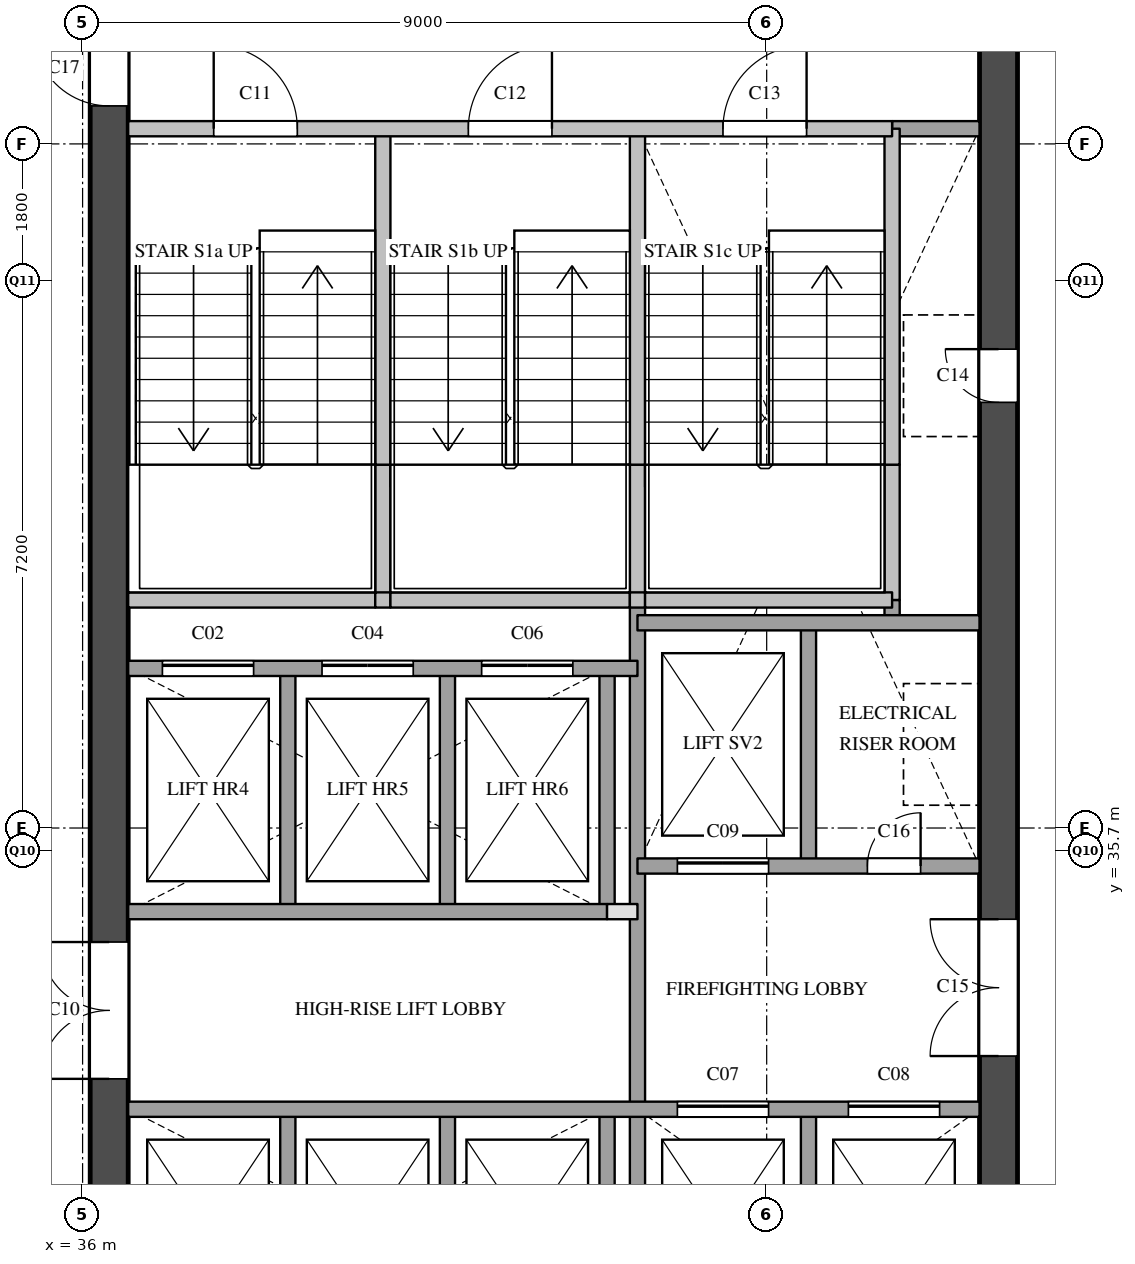
"""IFC4 building model, lengths in metres.
Left out: names, types, materials, properties, quantities, classifications, styles, units other than length and angle.
Written with IfcOpenShell. Run it as: python <this file> out.ifc"""

import sys

from ifc_helpers import new_model, si_unit, direction, frame, frame_2d, origin, place, context, subcontext, project, spatial, rectangle, extrude, element, fill, save


model = new_model("IFC4")
c1 = context("Model", 3, precision=1e-05, world=origin(), true_north=direction((0.0, 1.0)))
c2 = subcontext(c1, "Body", "Model", "MODEL_VIEW")
j1 = project(units=[si_unit("LENGTHUNIT", "METRE"), si_unit("PLANEANGLEUNIT", "RADIAN")], contexts=[c1])
p1 = place(None, origin())
s1 = spatial("IfcSite", under=j1, at=p1, CompositionType="ELEMENT")
p2 = place(p1, origin())
s2 = spatial("IfcBuilding", under=s1, at=p2, CompositionType="ELEMENT")
p3 = place(p2, frame((0.0, 0.0, 177.8)))
s3 = spatial("IfcBuildingStorey", under=s2, at=p3, CompositionType="ELEMENT", Elevation=177.8)
p4 = place(p3, frame((36.35, 29.1, 0.0), z_axis=(0.0, 0.0, 1.0), x_axis=(0.0, 1.0, 0.0)))
e1 = element("IfcWall", 1, at=p4, inside=s3, PredefinedType="SHEAR", context=c2, shape_type="SweptSolid", body=[
    extrude(rectangle(XDim=20.3, YDim=0.5, at=frame_2d((10.15, 0.0))), origin(), (0.0, 0.0, 1.0), 3.6),
])
p5 = place(p4, frame((3.6, 0.0, 0.0)))
e2 = element("IfcOpeningElement", 2, at=p5, cuts=e1, PredefinedType="OPENING", context=c2, shape_type="SweptSolid", body=[
    extrude(rectangle(XDim=1.8, YDim=2.1, at=frame_2d((0.9, 1.05))), frame((0.0, 0.26, 0.0), z_axis=(0.0, -1.0, 0.0), x_axis=(1.0, 0.0, 0.0)), (0.0, 0.0, 1.0), 0.52),
])
p6 = place(p4, frame((16.4, 0.0, 0.0)))
e3 = element("IfcOpeningElement", 3, at=p6, cuts=e1, PredefinedType="OPENING", context=c2, shape_type="SweptSolid", body=[
    extrude(rectangle(XDim=1.0, YDim=2.1, at=frame_2d((0.5, 1.05))), frame((0.0, 0.26, 0.0), z_axis=(0.0, -1.0, 0.0), x_axis=(1.0, 0.0, 0.0)), (0.0, 0.0, 1.0), 0.52),
])
p7 = place(p3, frame((48.05, 29.1, 0.0), z_axis=(0.0, 0.0, 1.0), x_axis=(0.0, 1.0, 0.0)))
e4 = element("IfcWall", 4, at=p7, inside=s3, PredefinedType="SHEAR", context=c2, shape_type="SweptSolid", body=[
    extrude(rectangle(XDim=20.3, YDim=0.5, at=frame_2d((10.15, 0.0))), origin(), (0.0, 0.0, 1.0), 3.6),
])
p8 = place(p7, frame((12.5, 0.0, 0.0)))
e5 = element("IfcOpeningElement", 5, at=p8, cuts=e4, PredefinedType="OPENING", context=c2, shape_type="SweptSolid", body=[
    extrude(rectangle(XDim=0.7, YDim=2.1, at=frame_2d((0.35, 1.05))), frame((0.0, 0.26, 0.0), z_axis=(0.0, -1.0, 0.0), x_axis=(1.0, 0.0, 0.0)), (0.0, 0.0, 1.0), 0.52),
])
p9 = place(p7, frame((3.9, 0.0, 0.0)))
e6 = element("IfcOpeningElement", 6, at=p9, cuts=e4, PredefinedType="OPENING", context=c2, shape_type="SweptSolid", body=[
    extrude(rectangle(XDim=1.8, YDim=2.1, at=frame_2d((0.9, 1.05))), frame((0.0, 0.26, 0.0), z_axis=(0.0, -1.0, 0.0), x_axis=(1.0, 0.0, 0.0)), (0.0, 0.0, 1.0), 0.52),
])
p10 = place(p3, frame((38.7, 29.1, 0.0), z_axis=(0.0, 0.0, 1.0), x_axis=(0.0, 1.0, 0.0)))
e7 = element("IfcWall", 7, at=p10, inside=s3, PredefinedType="SOLIDWALL", context=c2, shape_type="SweptSolid", body=[
    extrude(rectangle(XDim=3.2, YDim=0.2, at=frame_2d((1.6, 0.0))), origin(), (0.0, 0.0, 1.0), 3.6),
])
p11 = place(p3, frame((38.7, 34.9, 0.0), z_axis=(0.0, 0.0, 1.0), x_axis=(0.0, 1.0, 0.0)))
e8 = element("IfcWall", 8, at=p11, inside=s3, PredefinedType="SOLIDWALL", context=c2, shape_type="SweptSolid", body=[
    extrude(rectangle(XDim=3.2, YDim=0.2, at=frame_2d((1.6, 0.0))), origin(), (0.0, 0.0, 1.0), 3.6),
])
p12 = place(p3, frame((39.95, 39.0, 0.0), z_axis=(0.0, 0.0, 1.0), x_axis=(0.0, 1.0, 0.0)))
e9 = element("IfcWall", 9, at=p12, inside=s3, PredefinedType="SOLIDWALL", context=c2, shape_type="SweptSolid", body=[
    extrude(rectangle(XDim=1.78, YDim=0.2, at=frame_2d((0.89, 0.0))), origin(), (0.0, 0.0, 1.0), 3.6),
])
p13 = place(p3, frame((39.95, 40.78, 0.0), z_axis=(0.0, 0.0, 1.0), x_axis=(0.0, 1.0, 0.0)))
e10 = element("IfcWall", 10, at=p13, inside=s3, PredefinedType="SOLIDWALL", context=c2, shape_type="SweptSolid", body=[
    extrude(rectangle(XDim=4.42, YDim=0.2, at=frame_2d((2.21, 0.0))), origin(), (0.0, 0.0, 1.0), 3.6),
])
p14 = place(p3, frame((40.8, 29.1, 0.0), z_axis=(0.0, 0.0, 1.0), x_axis=(0.0, 1.0, 0.0)))
e11 = element("IfcWall", 11, at=p14, inside=s3, PredefinedType="SOLIDWALL", context=c2, shape_type="SweptSolid", body=[
    extrude(rectangle(XDim=3.2, YDim=0.2, at=frame_2d((1.6, 0.0))), origin(), (0.0, 0.0, 1.0), 3.6),
])
p15 = place(p3, frame((40.8, 34.9, 0.0), z_axis=(0.0, 0.0, 1.0), x_axis=(0.0, 1.0, 0.0)))
e12 = element("IfcWall", 12, at=p15, inside=s3, PredefinedType="SOLIDWALL", context=c2, shape_type="SweptSolid", body=[
    extrude(rectangle(XDim=3.2, YDim=0.2, at=frame_2d((1.6, 0.0))), origin(), (0.0, 0.0, 1.0), 3.6),
])
p16 = place(p3, frame((42.9, 29.1, 0.0), z_axis=(0.0, 0.0, 1.0), x_axis=(0.0, 1.0, 0.0)))
e13 = element("IfcWall", 13, at=p16, inside=s3, PredefinedType="SOLIDWALL", context=c2, shape_type="SweptSolid", body=[
    extrude(rectangle(XDim=3.2, YDim=0.2, at=frame_2d((1.6, 0.0))), origin(), (0.0, 0.0, 1.0), 3.6),
])
p17 = place(p3, frame((42.9, 34.9, 0.0), z_axis=(0.0, 0.0, 1.0), x_axis=(0.0, 1.0, 0.0)))
e14 = element("IfcWall", 14, at=p17, inside=s3, PredefinedType="SOLIDWALL", context=c2, shape_type="SweptSolid", body=[
    extrude(rectangle(XDim=3.2, YDim=0.2, at=frame_2d((1.6, 0.0))), origin(), (0.0, 0.0, 1.0), 3.6),
])
p18 = place(p3, frame((43.3, 29.1, 0.0), z_axis=(0.0, 0.0, 1.0), x_axis=(0.0, 1.0, 0.0)))
e15 = element("IfcWall", 15, at=p18, inside=s3, PredefinedType="SOLIDWALL", context=c2, shape_type="SweptSolid", body=[
    extrude(rectangle(XDim=9.9, YDim=0.2, at=frame_2d((4.95, 0.0))), origin(), (0.0, 0.0, 1.0), 3.6),
])
p19 = place(p3, frame((43.3, 39.0, 0.0), z_axis=(0.0, 0.0, 1.0), x_axis=(0.0, 1.0, 0.0)))
e16 = element("IfcWall", 16, at=p19, inside=s3, PredefinedType="SOLIDWALL", context=c2, shape_type="SweptSolid", body=[
    extrude(rectangle(XDim=1.78, YDim=0.2, at=frame_2d((0.89, 0.0))), origin(), (0.0, 0.0, 1.0), 3.6),
])
p20 = place(p3, frame((43.3, 40.78, 0.0), z_axis=(0.0, 0.0, 1.0), x_axis=(0.0, 1.0, 0.0)))
e17 = element("IfcWall", 17, at=p20, inside=s3, PredefinedType="SOLIDWALL", context=c2, shape_type="SweptSolid", body=[
    extrude(rectangle(XDim=4.42, YDim=0.2, at=frame_2d((2.21, 0.0))), origin(), (0.0, 0.0, 1.0), 3.6),
])
for number, where, z_axis, x_axis in (
    (18, (45.55, 29.1, 0.0), (0.0, 0.0, 1.0), (0.0, 1.0, 0.0)),
    (19, (45.55, 35.5, 0.0), (0.0, 0.0, 1.0), (0.0, 1.0, 0.0)),
):
    element("IfcWall", number, at=place(p3, frame(where, z_axis=z_axis, x_axis=x_axis)), inside=s3, PredefinedType="SOLIDWALL", context=c2, shape_type="SweptSolid", body=[
        extrude(rectangle(XDim=3.2, YDim=0.2, at=frame_2d((1.6, 0.0))), origin(), (0.0, 0.0, 1.0), 3.6),
    ])
p21 = place(p3, frame((46.65, 38.7, 0.0), z_axis=(0.0, 0.0, 1.0), x_axis=(0.0, 1.0, 0.0)))
e20 = element("IfcWall", 20, at=p21, inside=s3, PredefinedType="SOLIDWALL", context=c2, shape_type="SweptSolid", body=[
    extrude(rectangle(XDim=0.3, YDim=0.2, at=frame_2d((0.15, 0.0))), origin(), (0.0, 0.0, 1.0), 3.6),
])
p22 = place(p3, frame((46.65, 39.0, 0.0), z_axis=(0.0, 0.0, 1.0), x_axis=(0.0, 1.0, 0.0)))
e21 = element("IfcWall", 21, at=p22, inside=s3, PredefinedType="SOLIDWALL", context=c2, shape_type="SweptSolid", body=[
    extrude(rectangle(XDim=1.78, YDim=0.2, at=frame_2d((0.89, 0.0))), origin(), (0.0, 0.0, 1.0), 3.6),
])
p23 = place(p3, frame((46.65, 40.78, 0.0), z_axis=(0.0, 0.0, 1.0), x_axis=(0.0, 1.0, 0.0)))
e22 = element("IfcWall", 22, at=p23, inside=s3, PredefinedType="SOLIDWALL", context=c2, shape_type="SweptSolid", body=[
    extrude(rectangle(XDim=4.42, YDim=0.2, at=frame_2d((2.21, 0.0))), origin(), (0.0, 0.0, 1.0), 3.6),
])
p24 = place(p3, frame((36.6, 32.3, 0.0), z_axis=(0.0, 0.0, 1.0), x_axis=(1.0, 0.0, 0.0)))
e23 = element("IfcWall", 23, at=p24, inside=s3, PredefinedType="SOLIDWALL", context=c2, shape_type="SweptSolid", body=[
    extrude(rectangle(XDim=11.2, YDim=0.2, at=frame_2d((5.6, 0.0))), origin(), (0.0, 0.0, 1.0), 3.6),
])
p25 = place(p24, frame((7.225, 0.0, 0.0)))
e24 = element("IfcOpeningElement", 24, at=p25, cuts=e23, PredefinedType="OPENING", context=c2, shape_type="SweptSolid", body=[
    extrude(rectangle(XDim=1.2, YDim=2.1, at=frame_2d((0.6, 1.05))), frame((0.0, 0.11, 0.0), z_axis=(0.0, -1.0, 0.0), x_axis=(1.0, 0.0, 0.0)), (0.0, 0.0, 1.0), 0.22),
])
p26 = place(p24, frame((9.475, 0.0, 0.0)))
e25 = element("IfcOpeningElement", 25, at=p26, cuts=e23, PredefinedType="OPENING", context=c2, shape_type="SweptSolid", body=[
    extrude(rectangle(XDim=1.2, YDim=2.1, at=frame_2d((0.6, 1.05))), frame((0.0, 0.11, 0.0), z_axis=(0.0, -1.0, 0.0), x_axis=(1.0, 0.0, 0.0)), (0.0, 0.0, 1.0), 0.22),
])
p27 = place(p3, frame((42.9, 34.9, 0.0), z_axis=(0.0, 0.0, 1.0), x_axis=(1.0, 0.0, 0.0)))
e26 = element("IfcWall", 26, at=p27, inside=s3, PredefinedType="PARTITIONING", context=c2, shape_type="SweptSolid", body=[
    extrude(rectangle(XDim=0.4, YDim=0.2, at=frame_2d((0.2, 0.0))), origin(), (0.0, 0.0, 1.0), 3.6),
])
p28 = place(p3, frame((36.6, 34.9, 0.0), z_axis=(0.0, 0.0, 1.0), x_axis=(1.0, 0.0, 0.0)))
e27 = element("IfcWall", 27, at=p28, inside=s3, PredefinedType="SOLIDWALL", context=c2, shape_type="SweptSolid", body=[
    extrude(rectangle(XDim=6.3, YDim=0.2, at=frame_2d((3.15, 0.0))), origin(), (0.0, 0.0, 1.0), 3.6),
])
p29 = place(p3, frame((43.3, 35.5, 0.0), z_axis=(0.0, 0.0, 1.0), x_axis=(1.0, 0.0, 0.0)))
e28 = element("IfcWall", 28, at=p29, inside=s3, PredefinedType="SOLIDWALL", context=c2, shape_type="SweptSolid", body=[
    extrude(rectangle(XDim=4.5, YDim=0.2, at=frame_2d((2.25, 0.0))), origin(), (0.0, 0.0, 1.0), 3.6),
])
p30 = place(p29, frame((0.525, 0.0, 0.0)))
e29 = element("IfcOpeningElement", 29, at=p30, cuts=e28, PredefinedType="OPENING", context=c2, shape_type="SweptSolid", body=[
    extrude(rectangle(XDim=1.2, YDim=2.1, at=frame_2d((0.6, 1.05))), frame((0.0, 0.11, 0.0), z_axis=(0.0, -1.0, 0.0), x_axis=(1.0, 0.0, 0.0)), (0.0, 0.0, 1.0), 0.22),
])
p31 = place(p29, frame((3.025, 0.0, 0.0)))
e30 = element("IfcOpeningElement", 30, at=p31, cuts=e28, PredefinedType="OPENING", context=c2, shape_type="SweptSolid", body=[
    extrude(rectangle(XDim=0.7, YDim=2.1, at=frame_2d((0.35, 1.05))), frame((0.0, 0.11, 0.0), z_axis=(0.0, -1.0, 0.0), x_axis=(1.0, 0.0, 0.0)), (0.0, 0.0, 1.0), 0.22),
])
p32 = place(p3, frame((36.6, 38.1, 0.0), z_axis=(0.0, 0.0, 1.0), x_axis=(1.0, 0.0, 0.0)))
e31 = element("IfcWall", 31, at=p32, inside=s3, PredefinedType="SOLIDWALL", context=c2, shape_type="SweptSolid", body=[
    extrude(rectangle(XDim=6.7, YDim=0.2, at=frame_2d((3.35, 0.0))), origin(), (0.0, 0.0, 1.0), 3.6),
])
p33 = place(p32, frame((0.45, 0.0, 0.0)))
e32 = element("IfcOpeningElement", 32, at=p33, cuts=e31, PredefinedType="OPENING", context=c2, shape_type="SweptSolid", body=[
    extrude(rectangle(XDim=1.2, YDim=2.1, at=frame_2d((0.6, 1.05))), frame((0.0, 0.11, 0.0), z_axis=(0.0, -1.0, 0.0), x_axis=(1.0, 0.0, 0.0)), (0.0, 0.0, 1.0), 0.22),
])
p34 = place(p32, frame((2.55, 0.0, 0.0)))
e33 = element("IfcOpeningElement", 33, at=p34, cuts=e31, PredefinedType="OPENING", context=c2, shape_type="SweptSolid", body=[
    extrude(rectangle(XDim=1.2, YDim=2.1, at=frame_2d((0.6, 1.05))), frame((0.0, 0.11, 0.0), z_axis=(0.0, -1.0, 0.0), x_axis=(1.0, 0.0, 0.0)), (0.0, 0.0, 1.0), 0.22),
])
p35 = place(p32, frame((4.65, 0.0, 0.0)))
e34 = element("IfcOpeningElement", 34, at=p35, cuts=e31, PredefinedType="OPENING", context=c2, shape_type="SweptSolid", body=[
    extrude(rectangle(XDim=1.2, YDim=2.1, at=frame_2d((0.6, 1.05))), frame((0.0, 0.11, 0.0), z_axis=(0.0, -1.0, 0.0), x_axis=(1.0, 0.0, 0.0)), (0.0, 0.0, 1.0), 0.22),
])
p36 = place(p3, frame((43.3, 38.7, 0.0), z_axis=(0.0, 0.0, 1.0), x_axis=(1.0, 0.0, 0.0)))
e35 = element("IfcWall", 35, at=p36, inside=s3, PredefinedType="SOLIDWALL", context=c2, shape_type="SweptSolid", body=[
    extrude(rectangle(XDim=4.5, YDim=0.2, at=frame_2d((2.25, 0.0))), origin(), (0.0, 0.0, 1.0), 3.6),
])
p37 = place(p3, frame((36.6, 39.0, 0.0), z_axis=(0.0, 0.0, 1.0), x_axis=(1.0, 0.0, 0.0)))
e36 = element("IfcWall", 36, at=p37, inside=s3, PredefinedType="SOLIDWALL", context=c2, shape_type="SweptSolid", body=[
    extrude(rectangle(XDim=3.25, YDim=0.2, at=frame_2d((1.625, 0.0))), origin(), (0.0, 0.0, 1.0), 3.6),
])
p38 = place(p3, frame((39.85, 39.0, 0.0), z_axis=(0.0, 0.0, 1.0), x_axis=(1.0, 0.0, 0.0)))
e37 = element("IfcWall", 37, at=p38, inside=s3, PredefinedType="SOLIDWALL", context=c2, shape_type="SweptSolid", body=[
    extrude(rectangle(XDim=0.2, YDim=0.2, at=frame_2d((0.1, 0.0))), origin(), (0.0, 0.0, 1.0), 3.6),
])
p39 = place(p3, frame((40.05, 39.0, 0.0), z_axis=(0.0, 0.0, 1.0), x_axis=(1.0, 0.0, 0.0)))
e38 = element("IfcWall", 38, at=p39, inside=s3, PredefinedType="SOLIDWALL", context=c2, shape_type="SweptSolid", body=[
    extrude(rectangle(XDim=3.15, YDim=0.2, at=frame_2d((1.575, 0.0))), origin(), (0.0, 0.0, 1.0), 3.6),
])
p40 = place(p3, frame((43.2, 39.0, 0.0), z_axis=(0.0, 0.0, 1.0), x_axis=(1.0, 0.0, 0.0)))
e39 = element("IfcWall", 39, at=p40, inside=s3, PredefinedType="SOLIDWALL", context=c2, shape_type="SweptSolid", body=[
    extrude(rectangle(XDim=0.2, YDim=0.2, at=frame_2d((0.1, 0.0))), origin(), (0.0, 0.0, 1.0), 3.6),
])
p41 = place(p3, frame((43.4, 39.0, 0.0), z_axis=(0.0, 0.0, 1.0), x_axis=(1.0, 0.0, 0.0)))
e40 = element("IfcWall", 40, at=p41, inside=s3, PredefinedType="SOLIDWALL", context=c2, shape_type="SweptSolid", body=[
    extrude(rectangle(XDim=3.25, YDim=0.2, at=frame_2d((1.625, 0.0))), origin(), (0.0, 0.0, 1.0), 3.6),
])
p42 = place(p3, frame((46.65, 45.2, 0.0), z_axis=(0.0, 0.0, 1.0), x_axis=(1.0, 0.0, 0.0)))
e41 = element("IfcWall", 41, at=p42, inside=s3, PredefinedType="SOLIDWALL", context=c2, shape_type="SweptSolid", body=[
    extrude(rectangle(XDim=1.15, YDim=0.2, at=frame_2d((0.575, 0.0))), origin(), (0.0, 0.0, 1.0), 3.6),
])
p43 = place(p3, frame((36.6, 45.2, 0.0), z_axis=(0.0, 0.0, 1.0), x_axis=(1.0, 0.0, 0.0)))
e42 = element("IfcWall", 42, at=p43, inside=s3, PredefinedType="SOLIDWALL", context=c2, shape_type="SweptSolid", body=[
    extrude(rectangle(XDim=10.05, YDim=0.2, at=frame_2d((5.025, 0.0))), origin(), (0.0, 0.0, 1.0), 3.6),
])
p44 = place(p43, frame((1.125, 0.0, 0.0)))
e43 = element("IfcOpeningElement", 43, at=p44, cuts=e42, PredefinedType="OPENING", context=c2, shape_type="SweptSolid", body=[
    extrude(rectangle(XDim=1.1, YDim=2.1, at=frame_2d((0.55, 1.05))), frame((0.0, 0.11, 0.0), z_axis=(0.0, -1.0, 0.0), x_axis=(1.0, 0.0, 0.0)), (0.0, 0.0, 1.0), 0.22),
])
p45 = place(p43, frame((4.475, 0.0, 0.0)))
e44 = element("IfcOpeningElement", 44, at=p45, cuts=e42, PredefinedType="OPENING", context=c2, shape_type="SweptSolid", body=[
    extrude(rectangle(XDim=1.1, YDim=2.1, at=frame_2d((0.55, 1.05))), frame((0.0, 0.11, 0.0), z_axis=(0.0, -1.0, 0.0), x_axis=(1.0, 0.0, 0.0)), (0.0, 0.0, 1.0), 0.22),
])
p46 = place(p43, frame((7.825, 0.0, 0.0)))
e45 = element("IfcOpeningElement", 45, at=p46, cuts=e42, PredefinedType="OPENING", context=c2, shape_type="SweptSolid", body=[
    extrude(rectangle(XDim=1.1, YDim=2.1, at=frame_2d((0.55, 1.05))), frame((0.0, 0.11, 0.0), z_axis=(0.0, -1.0, 0.0), x_axis=(1.0, 0.0, 0.0)), (0.0, 0.0, 1.0), 0.22),
])
p47 = place(p33, origin())
e46 = element("IfcDoor", 46, at=p47, inside=s3, OperationType="SLIDING_TO_LEFT", PredefinedType="DOOR", context=c2, shape_type="SweptSolid", body=[
    extrude(rectangle(XDim=1.2, YDim=2.1, at=frame_2d((0.6, 1.05))), frame((0.0, 0.025, 0.0), z_axis=(0.0, -1.0, 0.0), x_axis=(1.0, 0.0, 0.0)), (0.0, 0.0, 1.0), 0.05),
])
fill(e32, e46)
p48 = place(p34, origin())
e47 = element("IfcDoor", 47, at=p48, inside=s3, OperationType="SLIDING_TO_LEFT", PredefinedType="DOOR", context=c2, shape_type="SweptSolid", body=[
    extrude(rectangle(XDim=1.2, YDim=2.1, at=frame_2d((0.6, 1.05))), frame((0.0, 0.025, 0.0), z_axis=(0.0, -1.0, 0.0), x_axis=(1.0, 0.0, 0.0)), (0.0, 0.0, 1.0), 0.05),
])
fill(e33, e47)
p49 = place(p35, origin())
e48 = element("IfcDoor", 48, at=p49, inside=s3, OperationType="SLIDING_TO_LEFT", PredefinedType="DOOR", context=c2, shape_type="SweptSolid", body=[
    extrude(rectangle(XDim=1.2, YDim=2.1, at=frame_2d((0.6, 1.05))), frame((0.0, 0.025, 0.0), z_axis=(0.0, -1.0, 0.0), x_axis=(1.0, 0.0, 0.0)), (0.0, 0.0, 1.0), 0.05),
])
fill(e34, e48)
p50 = place(p25, origin())
e49 = element("IfcDoor", 49, at=p50, inside=s3, OperationType="SLIDING_TO_LEFT", PredefinedType="DOOR", context=c2, shape_type="SweptSolid", body=[
    extrude(rectangle(XDim=1.2, YDim=2.1, at=frame_2d((0.6, 1.05))), frame((0.0, 0.025, 0.0), z_axis=(0.0, -1.0, 0.0), x_axis=(1.0, 0.0, 0.0)), (0.0, 0.0, 1.0), 0.05),
])
fill(e24, e49)
p51 = place(p26, origin())
e50 = element("IfcDoor", 50, at=p51, inside=s3, OperationType="SLIDING_TO_LEFT", PredefinedType="DOOR", context=c2, shape_type="SweptSolid", body=[
    extrude(rectangle(XDim=1.2, YDim=2.1, at=frame_2d((0.6, 1.05))), frame((0.0, 0.025, 0.0), z_axis=(0.0, -1.0, 0.0), x_axis=(1.0, 0.0, 0.0)), (0.0, 0.0, 1.0), 0.05),
])
fill(e25, e50)
p52 = place(p30, origin())
e51 = element("IfcDoor", 51, at=p52, inside=s3, OperationType="SLIDING_TO_LEFT", PredefinedType="DOOR", context=c2, shape_type="SweptSolid", body=[
    extrude(rectangle(XDim=1.2, YDim=2.1, at=frame_2d((0.6, 1.05))), frame((0.0, 0.025, 0.0), z_axis=(0.0, -1.0, 0.0), x_axis=(1.0, 0.0, 0.0)), (0.0, 0.0, 1.0), 0.05),
])
fill(e29, e51)
p53 = place(p5, origin())
e52 = element("IfcDoor", 52, at=p53, inside=s3, OperationType="DOUBLE_DOOR_SINGLE_SWING", PredefinedType="DOOR", context=c2, shape_type="SweptSolid", body=[
    extrude(rectangle(XDim=1.8, YDim=2.1, at=frame_2d((0.9, 1.05))), frame((0.0, 0.025, 0.0), z_axis=(0.0, -1.0, 0.0), x_axis=(1.0, 0.0, 0.0)), (0.0, 0.0, 1.0), 0.05),
])
fill(e2, e52)
p54 = place(p44, origin())
e53 = element("IfcDoor", 53, at=p54, inside=s3, OperationType="SINGLE_SWING_LEFT", PredefinedType="DOOR", context=c2, shape_type="SweptSolid", body=[
    extrude(rectangle(XDim=1.1, YDim=2.1, at=frame_2d((0.55, 1.05))), frame((0.0, 0.025, 0.0), z_axis=(0.0, -1.0, 0.0), x_axis=(1.0, 0.0, 0.0)), (0.0, 0.0, 1.0), 0.05),
])
fill(e43, e53)
p55 = place(p45, origin())
e54 = element("IfcDoor", 54, at=p55, inside=s3, OperationType="SINGLE_SWING_RIGHT", PredefinedType="DOOR", context=c2, shape_type="SweptSolid", body=[
    extrude(rectangle(XDim=1.1, YDim=2.1, at=frame_2d((0.55, 1.05))), frame((0.0, 0.025, 0.0), z_axis=(0.0, -1.0, 0.0), x_axis=(1.0, 0.0, 0.0)), (0.0, 0.0, 1.0), 0.05),
])
fill(e44, e54)
p56 = place(p46, origin())
e55 = element("IfcDoor", 55, at=p56, inside=s3, OperationType="SINGLE_SWING_RIGHT", PredefinedType="DOOR", context=c2, shape_type="SweptSolid", body=[
    extrude(rectangle(XDim=1.1, YDim=2.1, at=frame_2d((0.55, 1.05))), frame((0.0, 0.025, 0.0), z_axis=(0.0, -1.0, 0.0), x_axis=(1.0, 0.0, 0.0)), (0.0, 0.0, 1.0), 0.05),
])
fill(e45, e55)
p57 = place(p8, origin())
e56 = element("IfcDoor", 56, at=p57, inside=s3, OperationType="SINGLE_SWING_RIGHT", PredefinedType="DOOR", context=c2, shape_type="SweptSolid", body=[
    extrude(rectangle(XDim=0.7, YDim=2.1, at=frame_2d((0.35, 1.05))), frame((0.0, 0.025, 0.0), z_axis=(0.0, -1.0, 0.0), x_axis=(1.0, 0.0, 0.0)), (0.0, 0.0, 1.0), 0.05),
])
fill(e5, e56)
p58 = place(p9, origin())
e57 = element("IfcDoor", 57, at=p58, inside=s3, OperationType="DOUBLE_DOOR_SINGLE_SWING", PredefinedType="DOOR", context=c2, shape_type="SweptSolid", body=[
    extrude(rectangle(XDim=1.8, YDim=2.1, at=frame_2d((0.9, 1.05))), frame((0.0, 0.025, 0.0), z_axis=(0.0, -1.0, 0.0), x_axis=(1.0, 0.0, 0.0)), (0.0, 0.0, 1.0), 0.05),
])
fill(e6, e57)
p59 = place(p31, origin())
e58 = element("IfcDoor", 58, at=p59, inside=s3, OperationType="SINGLE_SWING_RIGHT", PredefinedType="DOOR", context=c2, shape_type="SweptSolid", body=[
    extrude(rectangle(XDim=0.7, YDim=2.1, at=frame_2d((0.35, 1.05))), frame((0.0, 0.025, 0.0), z_axis=(0.0, -1.0, 0.0), x_axis=(1.0, 0.0, 0.0)), (0.0, 0.0, 1.0), 0.05),
])
fill(e30, e58)
p60 = place(p6, origin())
e59 = element("IfcDoor", 59, at=p60, inside=s3, OperationType="SINGLE_SWING_RIGHT", PredefinedType="DOOR", context=c2, shape_type="SweptSolid", body=[
    extrude(rectangle(XDim=1.0, YDim=2.1, at=frame_2d((0.5, 1.05))), frame((0.0, 0.025, 0.0), z_axis=(0.0, -1.0, 0.0), x_axis=(1.0, 0.0, 0.0)), (0.0, 0.0, 1.0), 0.05),
])
fill(e3, e59)
save(model, sys.argv[1])
